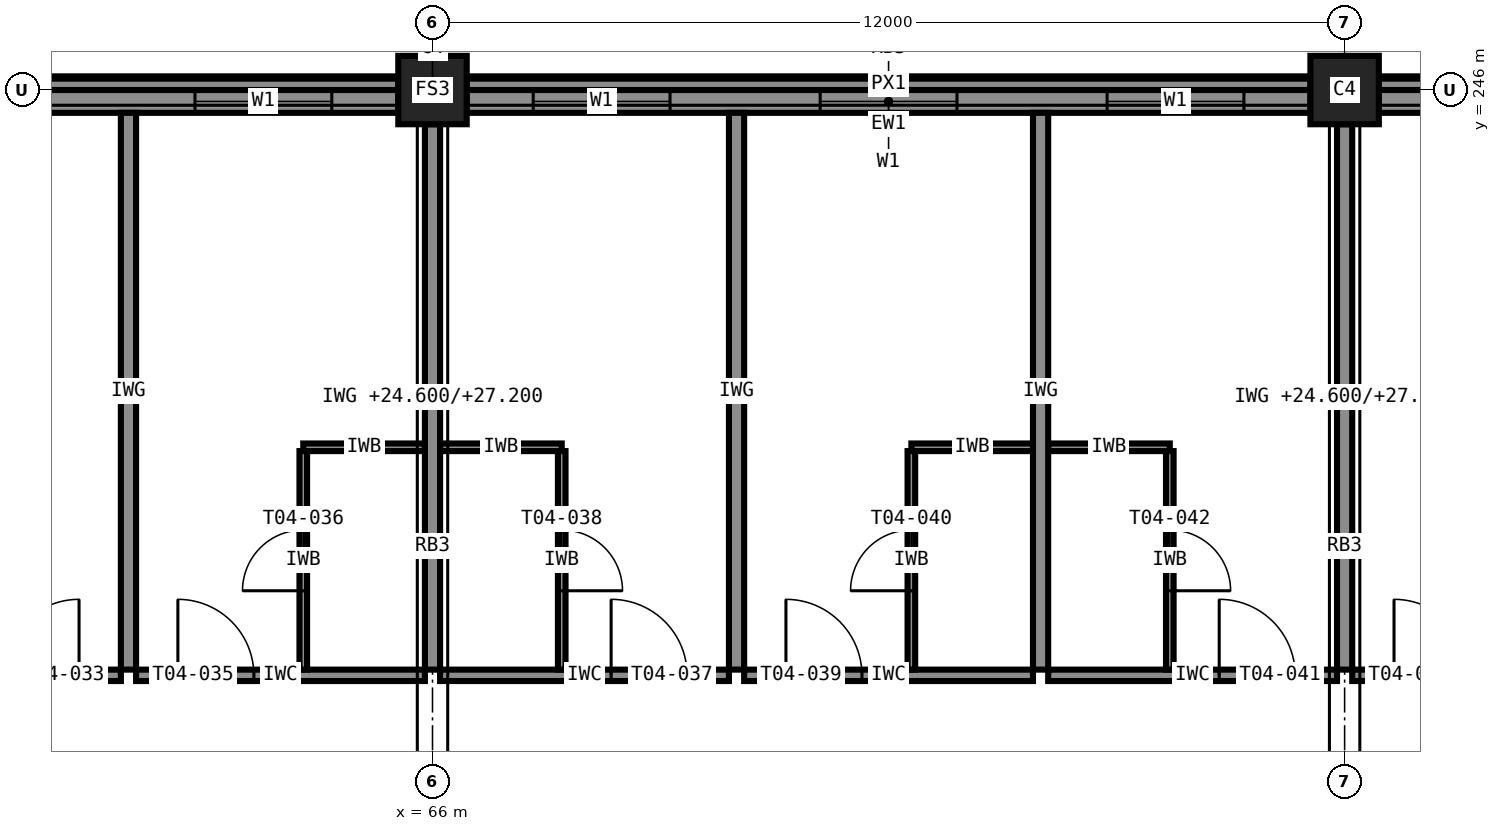
"""IFC4 building model, lengths in metres.
Left out: names, types, materials, properties, quantities, classifications, styles, units other than length and angle.
Written with IfcOpenShell. Run it as: python <this file> out.ifc"""

import sys

from ifc_helpers import new_model, si_unit, direction, frame, frame_2d, origin, origin_2d, place, context, subcontext, project, spatial, rectangle, extrude, element, fill, save


model = new_model("IFC4")
c1 = context("Model", 3, precision=1e-05, world=origin(), true_north=direction((0.0, 1.0)))
c2 = subcontext(c1, "Body", "Model", "MODEL_VIEW")
j1 = project(units=[si_unit("LENGTHUNIT", "METRE"), si_unit("PLANEANGLEUNIT", "RADIAN")], contexts=[c1])
p1 = place(None, origin())
s1 = spatial("IfcSite", under=j1, at=p1, CompositionType="ELEMENT")
p2 = place(p1, origin())
s2 = spatial("IfcBuilding", under=s1, at=p2, CompositionType="ELEMENT")
p3 = place(p2, frame((0.0, 0.0, 24.6)))
s3 = spatial("IfcBuildingStorey", under=s2, at=p3, CompositionType="ELEMENT", Elevation=24.6)
for number, where, z_axis, x_axis in (
    (1, (66.0, 246.0, 0.0), (0.0, 0.0, 1.0), (1.0, 0.0, 0.0)),
    (2, (78.0, 246.0, 0.0), (0.0, 0.0, 1.0), (1.0, 0.0, 0.0)),
):
    element("IfcColumn", number, at=place(p3, frame(where, z_axis=z_axis, x_axis=x_axis)), inside=s3, PredefinedType="COLUMN", context=c2, shape_type="SweptSolid", body=[
        extrude(rectangle(XDim=0.9, YDim=0.9, at=origin_2d()), origin(), (0.0, 0.0, 1.0), 3.6),
    ])
p4 = place(p3, frame((89.55, 245.85, 0.0), z_axis=(0.0, 0.0, 1.0), x_axis=(-1.0, 0.0, 0.0)))
e3 = element("IfcWall", 3, at=p4, inside=s3, PredefinedType="STANDARD", context=c2, shape_type="SweptSolid", body=[
    extrude(rectangle(XDim=11.1, YDim=0.3, at=frame_2d((5.55, 0.0))), origin(), (0.0, 0.0, 1.0), 2.6),
])
p5 = place(p4, frame((8.425, 0.0, 0.85)))
e4 = element("IfcOpeningElement", 4, at=p5, cuts=e3, PredefinedType="OPENING", context=c2, shape_type="SweptSolid", body=[
    extrude(rectangle(XDim=1.8, YDim=1.75, at=frame_2d((0.9, 0.875))), frame((0.0, 0.16, 0.0), z_axis=(0.0, -1.0, 0.0), x_axis=(1.0, 0.0, 0.0)), (0.0, 0.0, 1.0), 0.32),
])
p6 = place(p4, frame((1.025, 0.0, 0.85)))
e5 = element("IfcOpeningElement", 5, at=p6, cuts=e3, PredefinedType="OPENING", context=c2, shape_type="SweptSolid", body=[
    extrude(rectangle(XDim=1.8, YDim=1.75, at=frame_2d((0.9, 0.875))), frame((0.0, 0.16, 0.0), z_axis=(0.0, -1.0, 0.0), x_axis=(1.0, 0.0, 0.0)), (0.0, 0.0, 1.0), 0.32),
])
p7 = place(p4, frame((4.775, 0.0, 0.85)))
e6 = element("IfcOpeningElement", 6, at=p7, cuts=e3, PredefinedType="OPENING", context=c2, shape_type="SweptSolid", body=[
    extrude(rectangle(XDim=1.8, YDim=1.75, at=frame_2d((0.9, 0.875))), frame((0.0, 0.16, 0.0), z_axis=(0.0, -1.0, 0.0), x_axis=(1.0, 0.0, 0.0)), (0.0, 0.0, 1.0), 0.32),
])
p8 = place(p3, frame((77.55, 245.85, 0.0), z_axis=(0.0, 0.0, 1.0), x_axis=(-1.0, 0.0, 0.0)))
e7 = element("IfcWall", 7, at=p8, inside=s3, PredefinedType="STANDARD", context=c2, shape_type="SweptSolid", body=[
    extrude(rectangle(XDim=11.1, YDim=0.3, at=frame_2d((5.55, 0.0))), origin(), (0.0, 0.0, 1.0), 2.6),
])
p9 = place(p8, frame((8.425, 0.0, 0.85)))
e8 = element("IfcOpeningElement", 8, at=p9, cuts=e7, PredefinedType="OPENING", context=c2, shape_type="SweptSolid", body=[
    extrude(rectangle(XDim=1.8, YDim=1.75, at=frame_2d((0.9, 0.875))), frame((0.0, 0.16, 0.0), z_axis=(0.0, -1.0, 0.0), x_axis=(1.0, 0.0, 0.0)), (0.0, 0.0, 1.0), 0.32),
])
p10 = place(p8, frame((4.65, 0.0, 0.85)))
e9 = element("IfcOpeningElement", 9, at=p10, cuts=e7, PredefinedType="OPENING", context=c2, shape_type="SweptSolid", body=[
    extrude(rectangle(XDim=1.8, YDim=1.75, at=frame_2d((0.9, 0.875))), frame((0.0, 0.16, 0.0), z_axis=(0.0, -1.0, 0.0), x_axis=(1.0, 0.0, 0.0)), (0.0, 0.0, 1.0), 0.32),
])
p11 = place(p8, frame((0.875, 0.0, 0.85)))
e10 = element("IfcOpeningElement", 10, at=p11, cuts=e7, PredefinedType="OPENING", context=c2, shape_type="SweptSolid", body=[
    extrude(rectangle(XDim=1.8, YDim=1.75, at=frame_2d((0.9, 0.875))), frame((0.0, 0.16, 0.0), z_axis=(0.0, -1.0, 0.0), x_axis=(1.0, 0.0, 0.0)), (0.0, 0.0, 1.0), 0.32),
])
p12 = place(p3, frame((65.55, 245.85, 0.0), z_axis=(0.0, 0.0, 1.0), x_axis=(-1.0, 0.0, 0.0)))
e11 = element("IfcWall", 11, at=p12, inside=s3, PredefinedType="STANDARD", context=c2, shape_type="SweptSolid", body=[
    extrude(rectangle(XDim=11.1, YDim=0.3, at=frame_2d((5.55, 0.0))), origin(), (0.0, 0.0, 1.0), 2.6),
])
p13 = place(p12, frame((8.425, 0.0, 0.85)))
e12 = element("IfcOpeningElement", 12, at=p13, cuts=e11, PredefinedType="OPENING", context=c2, shape_type="SweptSolid", body=[
    extrude(rectangle(XDim=1.8, YDim=1.75, at=frame_2d((0.9, 0.875))), frame((0.0, 0.16, 0.0), z_axis=(0.0, -1.0, 0.0), x_axis=(1.0, 0.0, 0.0)), (0.0, 0.0, 1.0), 0.32),
])
p14 = place(p12, frame((4.65, 0.0, 0.85)))
e13 = element("IfcOpeningElement", 13, at=p14, cuts=e11, PredefinedType="OPENING", context=c2, shape_type="SweptSolid", body=[
    extrude(rectangle(XDim=1.8, YDim=1.75, at=frame_2d((0.9, 0.875))), frame((0.0, 0.16, 0.0), z_axis=(0.0, -1.0, 0.0), x_axis=(1.0, 0.0, 0.0)), (0.0, 0.0, 1.0), 0.32),
])
p15 = place(p12, frame((0.875, 0.0, 0.85)))
e14 = element("IfcOpeningElement", 14, at=p15, cuts=e11, PredefinedType="OPENING", context=c2, shape_type="SweptSolid", body=[
    extrude(rectangle(XDim=1.8, YDim=1.75, at=frame_2d((0.9, 0.875))), frame((0.0, 0.16, 0.0), z_axis=(0.0, -1.0, 0.0), x_axis=(1.0, 0.0, 0.0)), (0.0, 0.0, 1.0), 0.32),
])
for number, where, z_axis, x_axis in (
    (15, (89.55, 246.075, 3.4), (0.0, 0.0, 1.0), (-1.0, 0.0, 0.0)),
    (16, (77.55, 246.075, 3.4), (0.0, 0.0, 1.0), (-1.0, 0.0, 0.0)),
    (17, (65.55, 246.075, 3.4), (0.0, 0.0, 1.0), (-1.0, 0.0, 0.0)),
):
    element("IfcWall", number, at=place(p3, frame(where, z_axis=z_axis, x_axis=x_axis)), inside=s3, PredefinedType="STANDARD", context=c2, shape_type="SweptSolid", body=[
        extrude(rectangle(XDim=11.1, YDim=0.15, at=frame_2d((5.55, 0.0))), origin(), (0.0, 0.0, 1.0), 0.2),
    ])
p16 = place(p3, frame((58.1, 238.3, 0.0), z_axis=(0.0, 0.0, 1.0), x_axis=(1.0, 0.0, 0.0)))
e18 = element("IfcWall", 18, at=p16, inside=s3, PredefinedType="PARTITIONING", context=c2, shape_type="SweptSolid", body=[
    extrude(rectangle(XDim=3.8, YDim=0.15, at=frame_2d((1.9, 0.0))), origin(), (0.0, 0.0, 1.0), 3.4),
])
p17 = place(p16, frame((2.25, 0.0, 0.0)))
e19 = element("IfcOpeningElement", 19, at=p17, cuts=e18, PredefinedType="OPENING", context=c2, shape_type="SweptSolid", body=[
    extrude(rectangle(XDim=1.0, YDim=2.1, at=frame_2d((0.5, 1.05))), frame((0.0, 0.085, 0.0), z_axis=(0.0, -1.0, 0.0), x_axis=(1.0, 0.0, 0.0)), (0.0, 0.0, 1.0), 0.17),
])
p18 = place(p3, frame((62.1, 238.3, 0.0), z_axis=(0.0, 0.0, 1.0), x_axis=(1.0, 0.0, 0.0)))
e20 = element("IfcWall", 20, at=p18, inside=s3, PredefinedType="PARTITIONING", context=c2, shape_type="SweptSolid", body=[
    extrude(rectangle(XDim=3.8, YDim=0.15, at=frame_2d((1.9, 0.0))), origin(), (0.0, 0.0, 1.0), 3.4),
])
p19 = place(p18, frame((0.55, 0.0, 0.0)))
e21 = element("IfcOpeningElement", 21, at=p19, cuts=e20, PredefinedType="OPENING", context=c2, shape_type="SweptSolid", body=[
    extrude(rectangle(XDim=1.0, YDim=2.1, at=frame_2d((0.5, 1.05))), frame((0.0, 0.085, 0.0), z_axis=(0.0, -1.0, 0.0), x_axis=(1.0, 0.0, 0.0)), (0.0, 0.0, 1.0), 0.17),
])
p20 = place(p3, frame((64.3, 241.3, 0.0), z_axis=(0.0, 0.0, 1.0), x_axis=(1.0, 0.0, 0.0)))
e22 = element("IfcWall", 22, at=p20, inside=s3, PredefinedType="PARTITIONING", context=c2, shape_type="SweptSolid", body=[
    extrude(rectangle(XDim=1.6, YDim=0.1, at=frame_2d((0.8, 0.0))), origin(), (0.0, 0.0, 1.0), 3.4),
])
p21 = place(p3, frame((64.3, 238.375, 0.0), z_axis=(0.0, 0.0, 1.0), x_axis=(0.0, 1.0, 0.0)))
e23 = element("IfcWall", 23, at=p21, inside=s3, PredefinedType="PARTITIONING", context=c2, shape_type="SweptSolid", body=[
    extrude(rectangle(XDim=2.875, YDim=0.1, at=frame_2d((1.438, 0.0))), origin(), (0.0, 0.0, 1.0), 3.4),
])
p22 = place(p21, frame((1.038, 0.0, 0.0)))
e24 = element("IfcOpeningElement", 24, at=p22, cuts=e23, PredefinedType="OPENING", context=c2, shape_type="SweptSolid", body=[
    extrude(rectangle(XDim=0.8, YDim=2.1, at=frame_2d((0.4, 1.05))), frame((0.0, 0.06, 0.0), z_axis=(0.0, -1.0, 0.0), x_axis=(1.0, 0.0, 0.0)), (0.0, 0.0, 1.0), 0.12),
])
p23 = place(p3, frame((66.1, 238.3, 0.0), z_axis=(0.0, 0.0, 1.0), x_axis=(1.0, 0.0, 0.0)))
e25 = element("IfcWall", 25, at=p23, inside=s3, PredefinedType="PARTITIONING", context=c2, shape_type="SweptSolid", body=[
    extrude(rectangle(XDim=3.8, YDim=0.15, at=frame_2d((1.9, 0.0))), origin(), (0.0, 0.0, 1.0), 3.4),
])
p24 = place(p23, frame((2.25, 0.0, 0.0)))
e26 = element("IfcOpeningElement", 26, at=p24, cuts=e25, PredefinedType="OPENING", context=c2, shape_type="SweptSolid", body=[
    extrude(rectangle(XDim=1.0, YDim=2.1, at=frame_2d((0.5, 1.05))), frame((0.0, 0.085, 0.0), z_axis=(0.0, -1.0, 0.0), x_axis=(1.0, 0.0, 0.0)), (0.0, 0.0, 1.0), 0.17),
])
p25 = place(p3, frame((66.1, 241.3, 0.0), z_axis=(0.0, 0.0, 1.0), x_axis=(1.0, 0.0, 0.0)))
e27 = element("IfcWall", 27, at=p25, inside=s3, PredefinedType="PARTITIONING", context=c2, shape_type="SweptSolid", body=[
    extrude(rectangle(XDim=1.6, YDim=0.1, at=frame_2d((0.8, 0.0))), origin(), (0.0, 0.0, 1.0), 3.4),
])
p26 = place(p3, frame((67.7, 241.25, 0.0), z_axis=(0.0, 0.0, 1.0), x_axis=(0.0, -1.0, 0.0)))
e28 = element("IfcWall", 28, at=p26, inside=s3, PredefinedType="PARTITIONING", context=c2, shape_type="SweptSolid", body=[
    extrude(rectangle(XDim=2.875, YDim=0.1, at=frame_2d((1.438, 0.0))), origin(), (0.0, 0.0, 1.0), 3.4),
])
p27 = place(p26, frame((1.038, 0.0, 0.0)))
e29 = element("IfcOpeningElement", 29, at=p27, cuts=e28, PredefinedType="OPENING", context=c2, shape_type="SweptSolid", body=[
    extrude(rectangle(XDim=0.8, YDim=2.1, at=frame_2d((0.4, 1.05))), frame((0.0, 0.06, 0.0), z_axis=(0.0, -1.0, 0.0), x_axis=(1.0, 0.0, 0.0)), (0.0, 0.0, 1.0), 0.12),
])
p28 = place(p3, frame((70.1, 238.3, 0.0), z_axis=(0.0, 0.0, 1.0), x_axis=(1.0, 0.0, 0.0)))
e30 = element("IfcWall", 30, at=p28, inside=s3, PredefinedType="PARTITIONING", context=c2, shape_type="SweptSolid", body=[
    extrude(rectangle(XDim=3.8, YDim=0.15, at=frame_2d((1.9, 0.0))), origin(), (0.0, 0.0, 1.0), 3.4),
])
p29 = place(p28, frame((0.55, 0.0, 0.0)))
e31 = element("IfcOpeningElement", 31, at=p29, cuts=e30, PredefinedType="OPENING", context=c2, shape_type="SweptSolid", body=[
    extrude(rectangle(XDim=1.0, YDim=2.1, at=frame_2d((0.5, 1.05))), frame((0.0, 0.085, 0.0), z_axis=(0.0, -1.0, 0.0), x_axis=(1.0, 0.0, 0.0)), (0.0, 0.0, 1.0), 0.17),
])
p30 = place(p3, frame((72.3, 241.3, 0.0), z_axis=(0.0, 0.0, 1.0), x_axis=(1.0, 0.0, 0.0)))
e32 = element("IfcWall", 32, at=p30, inside=s3, PredefinedType="PARTITIONING", context=c2, shape_type="SweptSolid", body=[
    extrude(rectangle(XDim=1.6, YDim=0.1, at=frame_2d((0.8, 0.0))), origin(), (0.0, 0.0, 1.0), 3.4),
])
p31 = place(p3, frame((72.3, 238.375, 0.0), z_axis=(0.0, 0.0, 1.0), x_axis=(0.0, 1.0, 0.0)))
e33 = element("IfcWall", 33, at=p31, inside=s3, PredefinedType="PARTITIONING", context=c2, shape_type="SweptSolid", body=[
    extrude(rectangle(XDim=2.875, YDim=0.1, at=frame_2d((1.438, 0.0))), origin(), (0.0, 0.0, 1.0), 3.4),
])
p32 = place(p31, frame((1.038, 0.0, 0.0)))
e34 = element("IfcOpeningElement", 34, at=p32, cuts=e33, PredefinedType="OPENING", context=c2, shape_type="SweptSolid", body=[
    extrude(rectangle(XDim=0.8, YDim=2.1, at=frame_2d((0.4, 1.05))), frame((0.0, 0.06, 0.0), z_axis=(0.0, -1.0, 0.0), x_axis=(1.0, 0.0, 0.0)), (0.0, 0.0, 1.0), 0.12),
])
p33 = place(p3, frame((74.1, 238.3, 0.0), z_axis=(0.0, 0.0, 1.0), x_axis=(1.0, 0.0, 0.0)))
e35 = element("IfcWall", 35, at=p33, inside=s3, PredefinedType="PARTITIONING", context=c2, shape_type="SweptSolid", body=[
    extrude(rectangle(XDim=3.8, YDim=0.15, at=frame_2d((1.9, 0.0))), origin(), (0.0, 0.0, 1.0), 3.4),
])
p34 = place(p33, frame((2.25, 0.0, 0.0)))
e36 = element("IfcOpeningElement", 36, at=p34, cuts=e35, PredefinedType="OPENING", context=c2, shape_type="SweptSolid", body=[
    extrude(rectangle(XDim=1.0, YDim=2.1, at=frame_2d((0.5, 1.05))), frame((0.0, 0.085, 0.0), z_axis=(0.0, -1.0, 0.0), x_axis=(1.0, 0.0, 0.0)), (0.0, 0.0, 1.0), 0.17),
])
p35 = place(p3, frame((74.1, 241.3, 0.0), z_axis=(0.0, 0.0, 1.0), x_axis=(1.0, 0.0, 0.0)))
e37 = element("IfcWall", 37, at=p35, inside=s3, PredefinedType="PARTITIONING", context=c2, shape_type="SweptSolid", body=[
    extrude(rectangle(XDim=1.6, YDim=0.1, at=frame_2d((0.8, 0.0))), origin(), (0.0, 0.0, 1.0), 3.4),
])
p36 = place(p3, frame((75.7, 241.25, 0.0), z_axis=(0.0, 0.0, 1.0), x_axis=(0.0, -1.0, 0.0)))
e38 = element("IfcWall", 38, at=p36, inside=s3, PredefinedType="PARTITIONING", context=c2, shape_type="SweptSolid", body=[
    extrude(rectangle(XDim=2.875, YDim=0.1, at=frame_2d((1.438, 0.0))), origin(), (0.0, 0.0, 1.0), 3.4),
])
p37 = place(p36, frame((1.038, 0.0, 0.0)))
e39 = element("IfcOpeningElement", 39, at=p37, cuts=e38, PredefinedType="OPENING", context=c2, shape_type="SweptSolid", body=[
    extrude(rectangle(XDim=0.8, YDim=2.1, at=frame_2d((0.4, 1.05))), frame((0.0, 0.06, 0.0), z_axis=(0.0, -1.0, 0.0), x_axis=(1.0, 0.0, 0.0)), (0.0, 0.0, 1.0), 0.12),
])
p38 = place(p3, frame((78.1, 238.3, 0.0), z_axis=(0.0, 0.0, 1.0), x_axis=(1.0, 0.0, 0.0)))
e40 = element("IfcWall", 40, at=p38, inside=s3, PredefinedType="PARTITIONING", context=c2, shape_type="SweptSolid", body=[
    extrude(rectangle(XDim=3.8, YDim=0.15, at=frame_2d((1.9, 0.0))), origin(), (0.0, 0.0, 1.0), 3.4),
])
p39 = place(p38, frame((0.55, 0.0, 0.0)))
e41 = element("IfcOpeningElement", 41, at=p39, cuts=e40, PredefinedType="OPENING", context=c2, shape_type="SweptSolid", body=[
    extrude(rectangle(XDim=1.0, YDim=2.1, at=frame_2d((0.5, 1.05))), frame((0.0, 0.085, 0.0), z_axis=(0.0, -1.0, 0.0), x_axis=(1.0, 0.0, 0.0)), (0.0, 0.0, 1.0), 0.17),
])
p40 = place(p3, frame((62.0, 245.7, 0.0), z_axis=(0.0, 0.0, 1.0), x_axis=(0.0, -1.0, 0.0)))
e42 = element("IfcWall", 42, at=p40, inside=s3, PredefinedType="PARTITIONING", context=c2, shape_type="SweptSolid", body=[
    extrude(rectangle(XDim=7.325, YDim=0.2, at=frame_2d((3.663, 0.0))), origin(), (0.0, 0.0, 1.0), 3.4),
])
p41 = place(p3, frame((66.0, 245.55, 0.0), z_axis=(0.0, 0.0, 1.0), x_axis=(0.0, -1.0, 0.0)))
e43 = element("IfcWall", 43, at=p41, inside=s3, PredefinedType="PARTITIONING", context=c2, shape_type="SweptSolid", body=[
    extrude(rectangle(XDim=7.175, YDim=0.2, at=frame_2d((3.587, 0.0))), origin(), (0.0, 0.0, 1.0), 2.6),
])
for number, where, z_axis, x_axis in (
    (44, (70.0, 245.7, 0.0), (0.0, 0.0, 1.0), (0.0, -1.0, 0.0)),
    (45, (74.0, 245.7, 0.0), (0.0, 0.0, 1.0), (0.0, -1.0, 0.0)),
):
    element("IfcWall", number, at=place(p3, frame(where, z_axis=z_axis, x_axis=x_axis)), inside=s3, PredefinedType="PARTITIONING", context=c2, shape_type="SweptSolid", body=[
        extrude(rectangle(XDim=7.325, YDim=0.2, at=frame_2d((3.663, 0.0))), origin(), (0.0, 0.0, 1.0), 3.4),
    ])
p42 = place(p3, frame((78.0, 245.55, 0.0), z_axis=(0.0, 0.0, 1.0), x_axis=(0.0, -1.0, 0.0)))
e46 = element("IfcWall", 46, at=p42, inside=s3, PredefinedType="PARTITIONING", context=c2, shape_type="SweptSolid", body=[
    extrude(rectangle(XDim=7.175, YDim=0.2, at=frame_2d((3.587, 0.0))), origin(), (0.0, 0.0, 1.0), 2.6),
])
p43 = place(p9, origin())
e47 = element("IfcWindow", 47, at=p43, inside=s3, PartitioningType="SINGLE_PANEL", PredefinedType="WINDOW", context=c2, shape_type="SweptSolid", body=[
    extrude(rectangle(XDim=1.8, YDim=1.75, at=frame_2d((0.9, 0.875))), frame((0.0, 0.03, 0.0), z_axis=(0.0, -1.0, 0.0), x_axis=(1.0, 0.0, 0.0)), (0.0, 0.0, 1.0), 0.06),
])
fill(e8, e47)
p44 = place(p10, origin())
e48 = element("IfcWindow", 48, at=p44, inside=s3, PartitioningType="SINGLE_PANEL", PredefinedType="WINDOW", context=c2, shape_type="SweptSolid", body=[
    extrude(rectangle(XDim=1.8, YDim=1.75, at=frame_2d((0.9, 0.875))), frame((0.0, 0.03, 0.0), z_axis=(0.0, -1.0, 0.0), x_axis=(1.0, 0.0, 0.0)), (0.0, 0.0, 1.0), 0.06),
])
fill(e9, e48)
p45 = place(p11, origin())
e49 = element("IfcWindow", 49, at=p45, inside=s3, PartitioningType="SINGLE_PANEL", PredefinedType="WINDOW", context=c2, shape_type="SweptSolid", body=[
    extrude(rectangle(XDim=1.8, YDim=1.75, at=frame_2d((0.9, 0.875))), frame((0.0, 0.03, 0.0), z_axis=(0.0, -1.0, 0.0), x_axis=(1.0, 0.0, 0.0)), (0.0, 0.0, 1.0), 0.06),
])
fill(e10, e49)
p46 = place(p15, origin())
e50 = element("IfcWindow", 50, at=p46, inside=s3, PartitioningType="SINGLE_PANEL", PredefinedType="WINDOW", context=c2, shape_type="SweptSolid", body=[
    extrude(rectangle(XDim=1.8, YDim=1.75, at=frame_2d((0.9, 0.875))), frame((0.0, 0.03, 0.0), z_axis=(0.0, -1.0, 0.0), x_axis=(1.0, 0.0, 0.0)), (0.0, 0.0, 1.0), 0.06),
])
fill(e14, e50)
p47 = place(p17, origin())
e51 = element("IfcDoor", 51, at=p47, inside=s3, OperationType="SINGLE_SWING_RIGHT", PredefinedType="DOOR", context=c2, shape_type="SweptSolid", body=[
    extrude(rectangle(XDim=1.0, YDim=2.1, at=frame_2d((0.5, 1.05))), frame((0.0, 0.025, 0.0), z_axis=(0.0, -1.0, 0.0), x_axis=(1.0, 0.0, 0.0)), (0.0, 0.0, 1.0), 0.05),
])
fill(e19, e51)
p48 = place(p19, origin())
e52 = element("IfcDoor", 52, at=p48, inside=s3, OperationType="SINGLE_SWING_LEFT", PredefinedType="DOOR", context=c2, shape_type="SweptSolid", body=[
    extrude(rectangle(XDim=1.0, YDim=2.1, at=frame_2d((0.5, 1.05))), frame((0.0, 0.025, 0.0), z_axis=(0.0, -1.0, 0.0), x_axis=(1.0, 0.0, 0.0)), (0.0, 0.0, 1.0), 0.05),
])
fill(e21, e52)
p49 = place(p22, origin())
e53 = element("IfcDoor", 53, at=p49, inside=s3, OperationType="SINGLE_SWING_LEFT", PredefinedType="DOOR", context=c2, shape_type="SweptSolid", body=[
    extrude(rectangle(XDim=0.8, YDim=2.1, at=frame_2d((0.4, 1.05))), frame((0.0, 0.025, 0.0), z_axis=(0.0, -1.0, 0.0), x_axis=(1.0, 0.0, 0.0)), (0.0, 0.0, 1.0), 0.05),
])
fill(e24, e53)
p50 = place(p24, origin())
e54 = element("IfcDoor", 54, at=p50, inside=s3, OperationType="SINGLE_SWING_LEFT", PredefinedType="DOOR", context=c2, shape_type="SweptSolid", body=[
    extrude(rectangle(XDim=1.0, YDim=2.1, at=frame_2d((0.5, 1.05))), frame((0.0, 0.025, 0.0), z_axis=(0.0, -1.0, 0.0), x_axis=(1.0, 0.0, 0.0)), (0.0, 0.0, 1.0), 0.05),
])
fill(e26, e54)
p51 = place(p27, origin())
e55 = element("IfcDoor", 55, at=p51, inside=s3, OperationType="SINGLE_SWING_RIGHT", PredefinedType="DOOR", context=c2, shape_type="SweptSolid", body=[
    extrude(rectangle(XDim=0.8, YDim=2.1, at=frame_2d((0.4, 1.05))), frame((0.0, 0.025, 0.0), z_axis=(0.0, -1.0, 0.0), x_axis=(1.0, 0.0, 0.0)), (0.0, 0.0, 1.0), 0.05),
])
fill(e29, e55)
p52 = place(p29, origin())
e56 = element("IfcDoor", 56, at=p52, inside=s3, OperationType="SINGLE_SWING_LEFT", PredefinedType="DOOR", context=c2, shape_type="SweptSolid", body=[
    extrude(rectangle(XDim=1.0, YDim=2.1, at=frame_2d((0.5, 1.05))), frame((0.0, 0.025, 0.0), z_axis=(0.0, -1.0, 0.0), x_axis=(1.0, 0.0, 0.0)), (0.0, 0.0, 1.0), 0.05),
])
fill(e31, e56)
p53 = place(p32, origin())
e57 = element("IfcDoor", 57, at=p53, inside=s3, OperationType="SINGLE_SWING_LEFT", PredefinedType="DOOR", context=c2, shape_type="SweptSolid", body=[
    extrude(rectangle(XDim=0.8, YDim=2.1, at=frame_2d((0.4, 1.05))), frame((0.0, 0.025, 0.0), z_axis=(0.0, -1.0, 0.0), x_axis=(1.0, 0.0, 0.0)), (0.0, 0.0, 1.0), 0.05),
])
fill(e34, e57)
p54 = place(p34, origin())
e58 = element("IfcDoor", 58, at=p54, inside=s3, OperationType="SINGLE_SWING_LEFT", PredefinedType="DOOR", context=c2, shape_type="SweptSolid", body=[
    extrude(rectangle(XDim=1.0, YDim=2.1, at=frame_2d((0.5, 1.05))), frame((0.0, 0.025, 0.0), z_axis=(0.0, -1.0, 0.0), x_axis=(1.0, 0.0, 0.0)), (0.0, 0.0, 1.0), 0.05),
])
fill(e36, e58)
p55 = place(p37, origin())
e59 = element("IfcDoor", 59, at=p55, inside=s3, OperationType="SINGLE_SWING_RIGHT", PredefinedType="DOOR", context=c2, shape_type="SweptSolid", body=[
    extrude(rectangle(XDim=0.8, YDim=2.1, at=frame_2d((0.4, 1.05))), frame((0.0, 0.025, 0.0), z_axis=(0.0, -1.0, 0.0), x_axis=(1.0, 0.0, 0.0)), (0.0, 0.0, 1.0), 0.05),
])
fill(e39, e59)
p56 = place(p39, origin())
e60 = element("IfcDoor", 60, at=p56, inside=s3, OperationType="SINGLE_SWING_LEFT", PredefinedType="DOOR", context=c2, shape_type="SweptSolid", body=[
    extrude(rectangle(XDim=1.0, YDim=2.1, at=frame_2d((0.5, 1.05))), frame((0.0, 0.025, 0.0), z_axis=(0.0, -1.0, 0.0), x_axis=(1.0, 0.0, 0.0)), (0.0, 0.0, 1.0), 0.05),
])
fill(e41, e60)
save(model, sys.argv[1])
